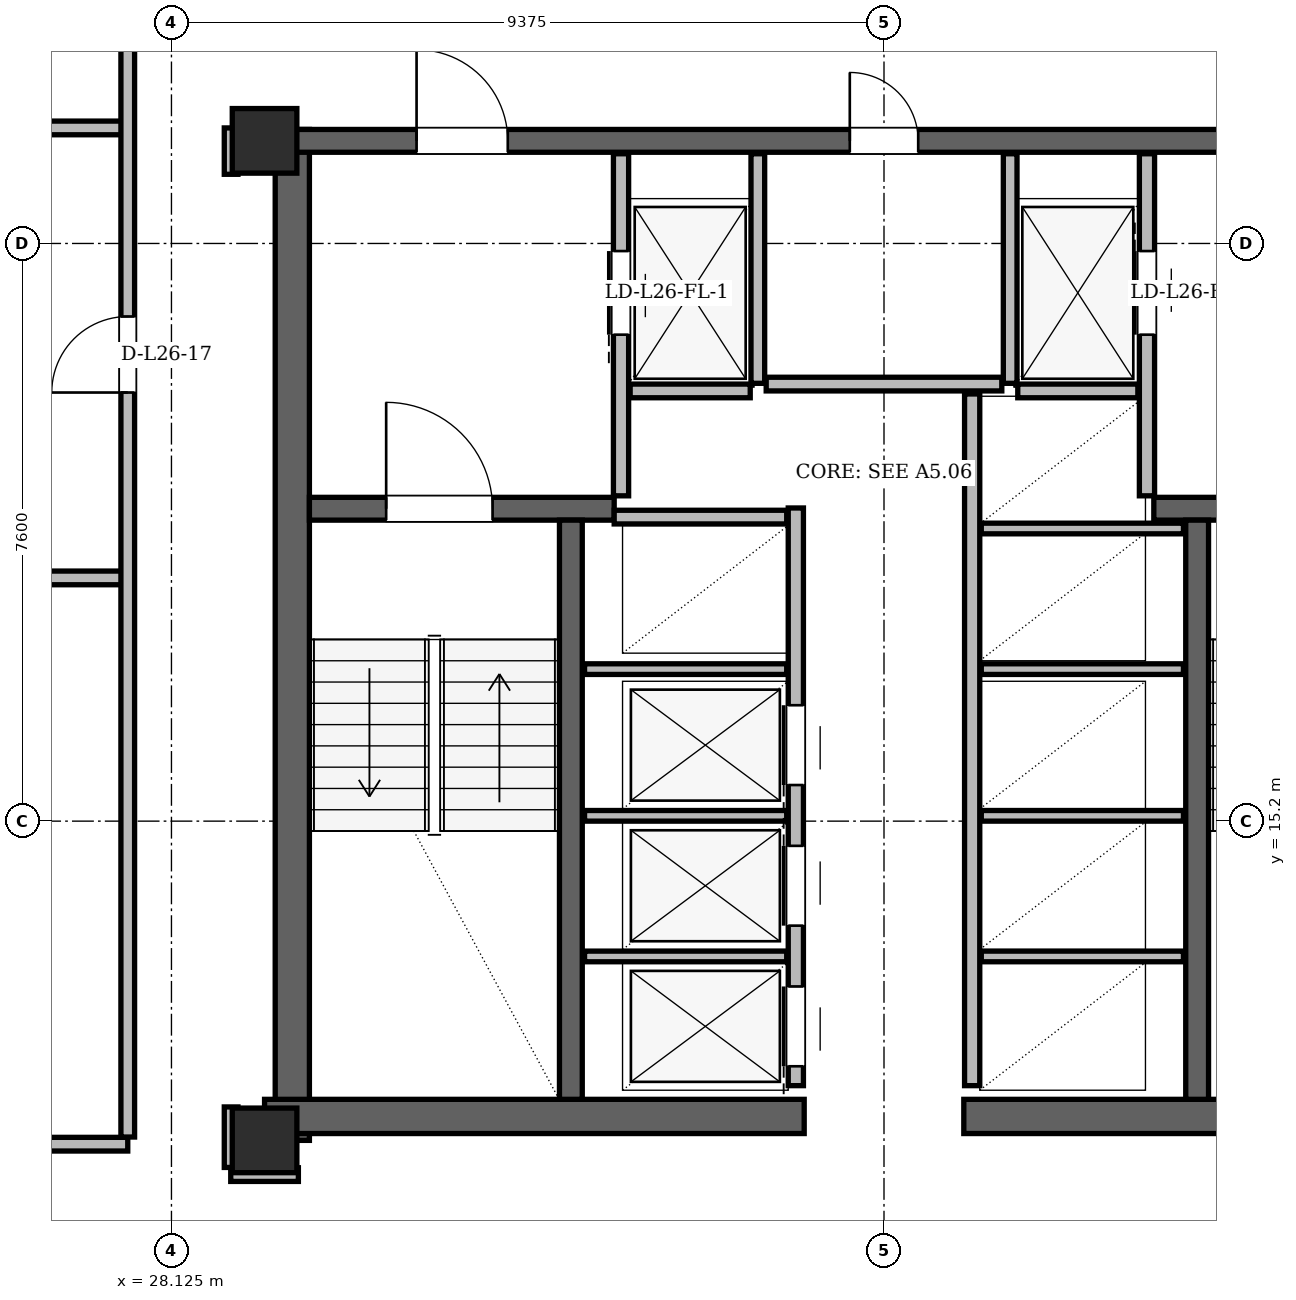
"""IFC4 building model, lengths in metres.
Left out: names, types, materials, properties, quantities, classifications, styles, units other than length and angle.
Written with IfcOpenShell. Run it as: python <this file> out.ifc"""

import sys

from ifc_helpers import new_model, si_unit, direction, frame, frame_2d, origin, origin_2d, place, context, subcontext, project, spatial, rectangle, hollow_rectangle, extrude, element, fill, save


model = new_model("IFC4")
c1 = context("Model", 3, precision=1e-05, world=origin(), true_north=direction((0.0, 1.0)))
c2 = subcontext(c1, "Body", "Model", "MODEL_VIEW")
j1 = project(units=[si_unit("LENGTHUNIT", "METRE"), si_unit("PLANEANGLEUNIT", "RADIAN")], contexts=[c1])
p1 = place(None, origin())
s1 = spatial("IfcSite", under=j1, at=p1, CompositionType="ELEMENT")
p2 = place(p1, origin())
s2 = spatial("IfcBuilding", under=s1, at=p2, CompositionType="ELEMENT")
p3 = place(p2, frame((0.0, 0.0, 100.5)))
s3 = spatial("IfcBuildingStorey", under=s2, at=p3, CompositionType="ELEMENT", Elevation=100.5)
for number, where, z_axis, x_axis in (
    (1, (29.35, 11.0, 0.0), (0.0, 0.0, 1.0), (1.0, 0.0, 0.0)),
    (2, (29.35, 24.15, 0.0), (0.0, 0.0, 1.0), (1.0, 0.0, 0.0)),
):
    element("IfcColumn", number, at=place(p3, frame(where, z_axis=z_axis, x_axis=x_axis)), inside=s3, PredefinedType="COLUMN", context=c2, shape_type="SweptSolid", body=[
        extrude(hollow_rectangle(XDim=0.85, YDim=0.85, WallThickness=0.07, at=origin_2d()), origin(), (0.0, 0.0, 1.0), 3.6),
    ])
p4 = place(p3, frame((29.715, 11.0, 0.0), z_axis=(0.0, 0.0, 1.0), x_axis=(0.0, 1.0, 0.0)))
e3 = element("IfcWall", 3, at=p4, inside=s3, PredefinedType="SHEAR", context=c2, shape_type="SweptSolid", body=[
    extrude(rectangle(XDim=13.3, YDim=0.45, at=frame_2d((6.65, 0.0))), origin(), (0.0, 0.0, 1.0), 3.36),
])
for number, where, z_axis, x_axis in (
    (4, (29.35, 11.315, 0.0), (0.0, 0.0, 1.0), (1.0, 0.0, 0.0)),
    (5, (38.55, 11.315, 0.0), (0.0, 0.0, 1.0), (1.0, 0.0, 0.0)),
):
    element("IfcWall", number, at=place(p3, frame(where, z_axis=z_axis, x_axis=x_axis)), inside=s3, PredefinedType="SHEAR", context=c2, shape_type="SweptSolid", body=[
        extrude(rectangle(XDim=7.1, YDim=0.45, at=frame_2d((3.55, 0.0))), origin(), (0.0, 0.0, 1.0), 3.36),
    ])
p5 = place(p3, frame((29.65, 24.15, 0.0), z_axis=(0.0, 0.0, 1.0), x_axis=(1.0, 0.0, 0.0)))
e6 = element("IfcWall", 6, at=p5, inside=s3, PredefinedType="SHEAR", context=c2, shape_type="SweptSolid", body=[
    extrude(rectangle(XDim=15.7, YDim=0.3, at=frame_2d((7.85, 0.0))), origin(), (0.0, 0.0, 1.0), 3.36),
])
p6 = place(p5, frame((1.7, 0.0, 0.0)))
e7 = element("IfcOpeningElement", 7, at=p6, cuts=e6, PredefinedType="OPENING", context=c2, shape_type="SweptSolid", body=[
    extrude(rectangle(XDim=1.2, YDim=2.2, at=frame_2d((0.6, 1.1))), frame((0.0, 0.15, 0.0), z_axis=(0.0, -1.0, 0.0), x_axis=(1.0, 0.0, 0.0)), (0.0, 0.0, 1.0), 0.3),
])
p7 = place(p5, frame((12.8, 0.0, 0.0)))
e8 = element("IfcOpeningElement", 8, at=p7, cuts=e6, PredefinedType="OPENING", context=c2, shape_type="SweptSolid", body=[
    extrude(rectangle(XDim=1.2, YDim=2.2, at=frame_2d((0.6, 1.1))), frame((0.0, 0.15, 0.0), z_axis=(0.0, -1.0, 0.0), x_axis=(1.0, 0.0, 0.0)), (0.0, 0.0, 1.0), 0.3),
])
p8 = place(p5, frame((7.4, 0.0, 0.0)))
e9 = element("IfcOpeningElement", 9, at=p8, cuts=e6, PredefinedType="OPENING", context=c2, shape_type="SweptSolid", body=[
    extrude(rectangle(XDim=0.9, YDim=2.05, at=frame_2d((0.45, 1.025))), frame((0.0, 0.15, 0.0), z_axis=(0.0, -1.0, 0.0), x_axis=(1.0, 0.0, 0.0)), (0.0, 0.0, 1.0), 0.3),
])
p9 = place(p3, frame((29.94, 19.31, 0.0), z_axis=(0.0, 0.0, 1.0), x_axis=(1.0, 0.0, 0.0)))
e10 = element("IfcWall", 10, at=p9, inside=s3, PredefinedType="SHEAR", context=c2, shape_type="SweptSolid", body=[
    extrude(rectangle(XDim=4.01, YDim=0.3, at=frame_2d((2.005, 0.0))), origin(), (0.0, 0.0, 1.0), 3.36),
])
p10 = place(p9, frame((1.01, 0.0, 0.0)))
e11 = element("IfcOpeningElement", 11, at=p10, cuts=e10, PredefinedType="OPENING", context=c2, shape_type="SweptSolid", body=[
    extrude(rectangle(XDim=1.4, YDim=2.2, at=frame_2d((0.7, 1.1))), frame((0.0, 0.15, 0.0), z_axis=(0.0, -1.0, 0.0), x_axis=(1.0, 0.0, 0.0)), (0.0, 0.0, 1.0), 0.3),
])
p11 = place(p3, frame((41.05, 19.31, 0.0), z_axis=(0.0, 0.0, 1.0), x_axis=(1.0, 0.0, 0.0)))
e12 = element("IfcWall", 12, at=p11, inside=s3, PredefinedType="SHEAR", context=c2, shape_type="SweptSolid", body=[
    extrude(rectangle(XDim=4.01, YDim=0.3, at=frame_2d((2.005, 0.0))), origin(), (0.0, 0.0, 1.0), 3.36),
])
p12 = place(p11, frame((1.6, 0.0, 0.0)))
e13 = element("IfcOpeningElement", 13, at=p12, cuts=e12, PredefinedType="OPENING", context=c2, shape_type="SweptSolid", body=[
    extrude(rectangle(XDim=1.4, YDim=2.2, at=frame_2d((0.7, 1.1))), frame((0.0, 0.15, 0.0), z_axis=(0.0, -1.0, 0.0), x_axis=(1.0, 0.0, 0.0)), (0.0, 0.0, 1.0), 0.3),
])
for number, where, z_axis, x_axis in (
    (14, (33.38, 11.54, 0.0), (0.0, 0.0, 1.0), (0.0, 1.0, 0.0)),
    (15, (41.62, 11.54, 0.0), (0.0, 0.0, 1.0), (0.0, 1.0, 0.0)),
):
    element("IfcWall", number, at=place(p3, frame(where, z_axis=z_axis, x_axis=x_axis)), inside=s3, PredefinedType="SHEAR", context=c2, shape_type="SweptSolid", body=[
        extrude(rectangle(XDim=7.62, YDim=0.3, at=frame_2d((3.81, 0.0))), origin(), (0.0, 0.0, 1.0), 3.36),
    ])
p13 = place(p3, frame((31.568, 43.453, 0.0), z_axis=(0.0, 0.0, 1.0), x_axis=(-0.500002056916, -0.86602421622, 0.0)))
e16 = element("IfcWall", 16, at=p13, inside=s3, PredefinedType="SOLIDWALL", context=c2, shape_type="SweptSolid", body=[
    extrude(rectangle(XDim=34.516, YDim=0.34, at=frame_2d((17.258, 0.0))), origin(), (0.0, 0.0, 1.0), 2.578),
])
p14 = place(p13, frame((8.034, 0.0, 0.0)))
e17 = element("IfcOpeningElement", 17, at=p14, cuts=e16, PredefinedType="OPENING", context=c2, shape_type="SweptSolid", body=[
    extrude(rectangle(XDim=1.5, YDim=2.2, at=frame_2d((0.75, 1.1))), frame((0.0, 0.17, 0.0), z_axis=(0.0, -1.0, 0.0), x_axis=(1.0, 0.0, 0.0)), (0.0, 0.0, 1.0), 0.34),
])
p15 = place(p13, frame((26.647, 0.0, 0.0)))
e18 = element("IfcOpeningElement", 18, at=p15, cuts=e16, PredefinedType="OPENING", context=c2, shape_type="SweptSolid", body=[
    extrude(rectangle(XDim=1.5, YDim=2.2, at=frame_2d((0.75, 1.1))), frame((0.0, 0.17, 0.0), z_axis=(0.0, -1.0, 0.0), x_axis=(1.0, 0.0, 0.0)), (0.0, 0.0, 1.0), 0.34),
])
p16 = place(p13, frame((31.672, 0.0, 0.85)))
e19 = element("IfcOpeningElement", 19, at=p16, cuts=e16, PredefinedType="OPENING", context=c2, shape_type="SweptSolid", body=[
    extrude(rectangle(XDim=1.6, YDim=1.618, at=frame_2d((0.8, 0.809))), frame((0.0, 0.17, 0.0), z_axis=(0.0, -1.0, 0.0), x_axis=(1.0, 0.0, 0.0)), (0.0, 0.0, 1.0), 0.34),
])
p17 = place(p13, frame((11.262, 0.0, 0.85)))
e20 = element("IfcOpeningElement", 20, at=p17, cuts=e16, PredefinedType="OPENING", context=c2, shape_type="SweptSolid", body=[
    extrude(rectangle(XDim=1.8, YDim=1.618, at=frame_2d((0.9, 0.809))), frame((0.0, 0.17, 0.0), z_axis=(0.0, -1.0, 0.0), x_axis=(1.0, 0.0, 0.0)), (0.0, 0.0, 1.0), 0.34),
])
p18 = place(p13, frame((18.602, 0.0, 0.85)))
e21 = element("IfcOpeningElement", 21, at=p18, cuts=e16, PredefinedType="OPENING", context=c2, shape_type="SweptSolid", body=[
    extrude(rectangle(XDim=1.2, YDim=1.48, at=frame_2d((0.6, 0.74))), frame((0.0, 0.17, 0.0), z_axis=(0.0, -1.0, 0.0), x_axis=(1.0, 0.0, 0.0)), (0.0, 0.0, 1.0), 0.34),
])
p19 = place(p13, frame((1.763, 0.0, 0.85)))
e22 = element("IfcOpeningElement", 22, at=p19, cuts=e16, PredefinedType="OPENING", context=c2, shape_type="SweptSolid", body=[
    extrude(rectangle(XDim=1.6, YDim=1.618, at=frame_2d((0.8, 0.809))), frame((0.0, 0.17, 0.0), z_axis=(0.0, -1.0, 0.0), x_axis=(1.0, 0.0, 0.0)), (0.0, 0.0, 1.0), 0.34),
])
p20 = place(p3, frame((34.04, 19.48, 0.0), z_axis=(0.0, 0.0, 1.0), x_axis=(0.0, 1.0, 0.0)))
e23 = element("IfcWall", 23, at=p20, inside=s3, PredefinedType="PARTITIONING", context=c2, shape_type="SweptSolid", body=[
    extrude(rectangle(XDim=4.5, YDim=0.2, at=frame_2d((2.25, 0.0))), origin(), (0.0, 0.0, 1.0), 2.4),
])
p21 = place(p20, frame((2.12, 0.0, 0.0)))
e24 = element("IfcOpeningElement", 24, at=p21, cuts=e23, PredefinedType="OPENING", context=c2, shape_type="SweptSolid", body=[
    extrude(rectangle(XDim=1.1, YDim=2.2, at=frame_2d((0.55, 1.1))), frame((0.0, 0.1, 0.0), z_axis=(0.0, -1.0, 0.0), x_axis=(1.0, 0.0, 0.0)), (0.0, 0.0, 1.0), 0.2),
])
p22 = place(p3, frame((35.84, 20.96, 0.0), z_axis=(0.0, 0.0, 1.0), x_axis=(0.0, 1.0, 0.0)))
e25 = element("IfcWall", 25, at=p22, inside=s3, PredefinedType="PARTITIONING", context=c2, shape_type="SweptSolid", body=[
    extrude(rectangle(XDim=3.02, YDim=0.18, at=frame_2d((1.51, 0.0))), origin(), (0.0, 0.0, 1.0), 2.4),
])
p23 = place(p3, frame((34.16, 20.86, 0.0), z_axis=(0.0, 0.0, 1.0), x_axis=(1.0, 0.0, 0.0)))
e26 = element("IfcWall", 26, at=p23, inside=s3, PredefinedType="PARTITIONING", context=c2, shape_type="SweptSolid", body=[
    extrude(rectangle(XDim=1.58, YDim=0.18, at=frame_2d((0.79, 0.0))), origin(), (0.0, 0.0, 1.0), 3.36),
])
p24 = place(p3, frame((40.96, 19.48, 0.0), z_axis=(0.0, 0.0, 1.0), x_axis=(0.0, 1.0, 0.0)))
e27 = element("IfcWall", 27, at=p24, inside=s3, PredefinedType="PARTITIONING", context=c2, shape_type="SweptSolid", body=[
    extrude(rectangle(XDim=4.5, YDim=0.2, at=frame_2d((2.25, 0.0))), origin(), (0.0, 0.0, 1.0), 2.4),
])
p25 = place(p24, frame((2.12, 0.0, 0.0)))
e28 = element("IfcOpeningElement", 28, at=p25, cuts=e27, PredefinedType="OPENING", context=c2, shape_type="SweptSolid", body=[
    extrude(rectangle(XDim=1.1, YDim=2.2, at=frame_2d((0.55, 1.1))), frame((0.0, 0.1, 0.0), z_axis=(0.0, -1.0, 0.0), x_axis=(1.0, 0.0, 0.0)), (0.0, 0.0, 1.0), 0.2),
])
p26 = place(p3, frame((39.16, 20.96, 0.0), z_axis=(0.0, 0.0, 1.0), x_axis=(0.0, 1.0, 0.0)))
e29 = element("IfcWall", 29, at=p26, inside=s3, PredefinedType="PARTITIONING", context=c2, shape_type="SweptSolid", body=[
    extrude(rectangle(XDim=3.02, YDim=0.18, at=frame_2d((1.51, 0.0))), origin(), (0.0, 0.0, 1.0), 2.4),
])
p27 = place(p3, frame((39.26, 20.86, 0.0), z_axis=(0.0, 0.0, 1.0), x_axis=(1.0, 0.0, 0.0)))
e30 = element("IfcWall", 30, at=p27, inside=s3, PredefinedType="PARTITIONING", context=c2, shape_type="SweptSolid", body=[
    extrude(rectangle(XDim=1.58, YDim=0.18, at=frame_2d((0.79, 0.0))), origin(), (0.0, 0.0, 1.0), 3.36),
])
p28 = place(p3, frame((36.34, 11.72, 0.0), z_axis=(0.0, 0.0, 1.0), x_axis=(0.0, 1.0, 0.0)))
e31 = element("IfcWall", 31, at=p28, inside=s3, PredefinedType="PARTITIONING", context=c2, shape_type="SweptSolid", body=[
    extrude(rectangle(XDim=7.6, YDim=0.2, at=frame_2d((3.8, 0.0))), origin(), (0.0, 0.0, 1.0), 3.36),
])
p29 = place(p28, frame((0.255, 0.0, 0.0)))
e32 = element("IfcOpeningElement", 32, at=p29, cuts=e31, PredefinedType="OPENING", context=c2, shape_type="SweptSolid", body=[
    extrude(rectangle(XDim=1.05, YDim=2.15, at=frame_2d((0.525, 1.075))), frame((0.0, 0.1, 0.0), z_axis=(0.0, -1.0, 0.0), x_axis=(1.0, 0.0, 0.0)), (0.0, 0.0, 1.0), 0.2),
])
p30 = place(p28, frame((2.105, 0.0, 0.0)))
e33 = element("IfcOpeningElement", 33, at=p30, cuts=e31, PredefinedType="OPENING", context=c2, shape_type="SweptSolid", body=[
    extrude(rectangle(XDim=1.05, YDim=2.15, at=frame_2d((0.525, 1.075))), frame((0.0, 0.1, 0.0), z_axis=(0.0, -1.0, 0.0), x_axis=(1.0, 0.0, 0.0)), (0.0, 0.0, 1.0), 0.2),
])
p31 = place(p28, frame((3.955, 0.0, 0.0)))
e34 = element("IfcOpeningElement", 34, at=p31, cuts=e31, PredefinedType="OPENING", context=c2, shape_type="SweptSolid", body=[
    extrude(rectangle(XDim=1.05, YDim=2.15, at=frame_2d((0.525, 1.075))), frame((0.0, 0.1, 0.0), z_axis=(0.0, -1.0, 0.0), x_axis=(1.0, 0.0, 0.0)), (0.0, 0.0, 1.0), 0.2),
])
p32 = place(p3, frame((33.95, 19.2, 0.0), z_axis=(0.0, 0.0, 1.0), x_axis=(1.0, 0.0, 0.0)))
e35 = element("IfcWall", 35, at=p32, inside=s3, PredefinedType="PARTITIONING", context=c2, shape_type="SweptSolid", body=[
    extrude(rectangle(XDim=2.27, YDim=0.18, at=frame_2d((1.135, 0.0))), origin(), (0.0, 0.0, 1.0), 3.36),
])
for number, where, z_axis, x_axis in (
    (36, (33.56, 13.42, 0.0), (0.0, 0.0, 1.0), (1.0, 0.0, 0.0)),
    (37, (33.56, 15.27, 0.0), (0.0, 0.0, 1.0), (1.0, 0.0, 0.0)),
    (38, (33.56, 17.2, 0.0), (0.0, 0.0, 1.0), (1.0, 0.0, 0.0)),
):
    element("IfcWall", number, at=place(p3, frame(where, z_axis=z_axis, x_axis=x_axis)), inside=s3, PredefinedType="PARTITIONING", context=c2, shape_type="SweptSolid", body=[
        extrude(rectangle(XDim=2.66, YDim=0.14, at=frame_2d((1.33, 0.0))), origin(), (0.0, 0.0, 1.0), 3.36),
    ])
p33 = place(p3, frame((38.66, 11.72, 0.0), z_axis=(0.0, 0.0, 1.0), x_axis=(0.0, 1.0, 0.0)))
e39 = element("IfcWall", 39, at=p33, inside=s3, PredefinedType="PARTITIONING", context=c2, shape_type="SweptSolid", body=[
    extrude(rectangle(XDim=9.1, YDim=0.2, at=frame_2d((4.55, 0.0))), origin(), (0.0, 0.0, 1.0), 3.36),
])
for number, where, z_axis, x_axis in (
    (40, (38.78, 13.42, 0.0), (0.0, 0.0, 1.0), (1.0, 0.0, 0.0)),
    (41, (38.78, 15.27, 0.0), (0.0, 0.0, 1.0), (1.0, 0.0, 0.0)),
    (42, (38.78, 17.2, 0.0), (0.0, 0.0, 1.0), (1.0, 0.0, 0.0)),
    (43, (38.78, 19.05, 0.0), (0.0, 0.0, 1.0), (1.0, 0.0, 0.0)),
):
    element("IfcWall", number, at=place(p3, frame(where, z_axis=z_axis, x_axis=x_axis)), inside=s3, PredefinedType="PARTITIONING", context=c2, shape_type="SweptSolid", body=[
        extrude(rectangle(XDim=2.66, YDim=0.14, at=frame_2d((1.33, 0.0))), origin(), (0.0, 0.0, 1.0), 3.36),
    ])
p34 = place(p3, frame((35.95, 20.95, 0.0), z_axis=(0.0, 0.0, 1.0), x_axis=(1.0, 0.0, 0.0)))
e44 = element("IfcWall", 44, at=p34, inside=s3, PredefinedType="PARTITIONING", context=c2, shape_type="SweptSolid", body=[
    extrude(rectangle(XDim=3.1, YDim=0.18, at=frame_2d((1.55, 0.0))), origin(), (0.0, 0.0, 1.0), 3.36),
])
p35 = place(p3, frame((28.905, 10.55, 0.0), z_axis=(0.0, 0.0, 1.0), x_axis=(1.0, 0.0, 0.0)))
e45 = element("IfcWall", 45, at=p35, inside=s3, PredefinedType="PARTITIONING", context=c2, shape_type="SweptSolid", body=[
    extrude(rectangle(XDim=0.89, YDim=0.18, at=frame_2d((0.445, 0.0))), origin(), (0.0, 0.0, 1.0), 3.36),
])
p36 = place(p3, frame((19.2, 10.95, 0.0), z_axis=(0.0, 0.0, 1.0), x_axis=(1.0, 0.0, 0.0)))
e46 = element("IfcWall", 46, at=p36, inside=s3, PredefinedType="PARTITIONING", context=c2, shape_type="SweptSolid", body=[
    extrude(rectangle(XDim=8.35, YDim=0.18, at=frame_2d((4.175, 0.0))), origin(), (0.0, 0.0, 1.0), 3.36),
])
p37 = place(p3, frame((17.32, 18.4, 0.0), z_axis=(0.0, 0.0, 1.0), x_axis=(1.0, 0.0, 0.0)))
e47 = element("IfcWall", 47, at=p37, inside=s3, PredefinedType="PARTITIONING", context=c2, shape_type="SweptSolid", body=[
    extrude(rectangle(XDim=10.29, YDim=0.18, at=frame_2d((5.145, 0.0))), origin(), (0.0, 0.0, 1.0), 3.36),
])
p38 = place(p3, frame((20.723, 24.32, 0.0), z_axis=(0.0, 0.0, 1.0), x_axis=(1.0, 0.0, 0.0)))
e48 = element("IfcWall", 48, at=p38, inside=s3, PredefinedType="PARTITIONING", context=c2, shape_type="SweptSolid", body=[
    extrude(rectangle(XDim=6.887, YDim=0.18, at=frame_2d((3.444, 0.0))), origin(), (0.0, 0.0, 1.0), 3.36),
])
p39 = place(p3, frame((27.55, 11.044, 0.0), z_axis=(0.0, 0.0, 1.0), x_axis=(0.0, 1.0, 0.0)))
e49 = element("IfcWall", 49, at=p39, inside=s3, PredefinedType="PARTITIONING", context=c2, shape_type="SweptSolid", body=[
    extrude(rectangle(XDim=14.832, YDim=0.18, at=frame_2d((7.416, 0.0))), origin(), (0.0, 0.0, 1.0), 2.814),
])
p40 = place(p39, frame((9.795, 0.0, 0.0)))
e50 = element("IfcOpeningElement", 50, at=p40, cuts=e49, PredefinedType="OPENING", context=c2, shape_type="SweptSolid", body=[
    extrude(rectangle(XDim=1.0, YDim=2.18, at=frame_2d((0.5, 1.09))), frame((0.0, 0.09, 0.0), z_axis=(0.0, -1.0, 0.0), x_axis=(1.0, 0.0, 0.0)), (0.0, 0.0, 1.0), 0.18),
])
p41 = place(p3, frame((28.91, 10.644, 0.0), z_axis=(0.0, 0.0, 1.0), x_axis=(0.0, 1.0, 0.0)))
e51 = element("IfcWall", 51, at=p41, inside=s3, PredefinedType="PARTITIONING", context=c2, shape_type="SweptSolid", body=[
    extrude(rectangle(XDim=0.796, YDim=0.18, at=frame_2d((0.398, 0.0))), origin(), (0.0, 0.0, 1.0), 2.814),
])
p42 = place(p3, frame((28.91, 23.71, 0.0), z_axis=(0.0, 0.0, 1.0), x_axis=(0.0, 1.0, 0.0)))
e52 = element("IfcWall", 52, at=p42, inside=s3, PredefinedType="PARTITIONING", context=c2, shape_type="SweptSolid", body=[
    extrude(rectangle(XDim=0.61, YDim=0.18, at=frame_2d((0.305, 0.0))), origin(), (0.0, 0.0, 1.0), 3.36),
])
p43 = place(p21, origin())
e53 = element("IfcDoor", 53, at=p43, inside=s3, OperationType="SLIDING_TO_LEFT", PredefinedType="DOOR", context=c2, shape_type="SweptSolid", body=[
    extrude(rectangle(XDim=1.1, YDim=2.2, at=frame_2d((0.55, 1.1))), frame((0.0, 0.025, 0.0), z_axis=(0.0, -1.0, 0.0), x_axis=(1.0, 0.0, 0.0)), (0.0, 0.0, 1.0), 0.05),
])
fill(e24, e53)
p44 = place(p25, origin())
e54 = element("IfcDoor", 54, at=p44, inside=s3, OperationType="SLIDING_TO_RIGHT", PredefinedType="DOOR", context=c2, shape_type="SweptSolid", body=[
    extrude(rectangle(XDim=1.1, YDim=2.2, at=frame_2d((0.55, 1.1))), frame((0.0, 0.025, 0.0), z_axis=(0.0, -1.0, 0.0), x_axis=(1.0, 0.0, 0.0)), (0.0, 0.0, 1.0), 0.05),
])
fill(e28, e54)
p45 = place(p29, origin())
e55 = element("IfcDoor", 55, at=p45, inside=s3, OperationType="SLIDING_TO_LEFT", PredefinedType="DOOR", context=c2, shape_type="SweptSolid", body=[
    extrude(rectangle(XDim=1.05, YDim=2.15, at=frame_2d((0.525, 1.075))), frame((0.0, 0.025, 0.0), z_axis=(0.0, -1.0, 0.0), x_axis=(1.0, 0.0, 0.0)), (0.0, 0.0, 1.0), 0.05),
])
fill(e32, e55)
p46 = place(p30, origin())
e56 = element("IfcDoor", 56, at=p46, inside=s3, OperationType="SLIDING_TO_RIGHT", PredefinedType="DOOR", context=c2, shape_type="SweptSolid", body=[
    extrude(rectangle(XDim=1.05, YDim=2.15, at=frame_2d((0.525, 1.075))), frame((0.0, 0.025, 0.0), z_axis=(0.0, -1.0, 0.0), x_axis=(1.0, 0.0, 0.0)), (0.0, 0.0, 1.0), 0.05),
])
fill(e33, e56)
p47 = place(p31, origin())
e57 = element("IfcDoor", 57, at=p47, inside=s3, OperationType="SLIDING_TO_LEFT", PredefinedType="DOOR", context=c2, shape_type="SweptSolid", body=[
    extrude(rectangle(XDim=1.05, YDim=2.15, at=frame_2d((0.525, 1.075))), frame((0.0, 0.025, 0.0), z_axis=(0.0, -1.0, 0.0), x_axis=(1.0, 0.0, 0.0)), (0.0, 0.0, 1.0), 0.05),
])
fill(e34, e57)
p48 = place(p10, origin())
e58 = element("IfcDoor", 58, at=p48, inside=s3, OperationType="SINGLE_SWING_LEFT", PredefinedType="DOOR", context=c2, shape_type="SweptSolid", body=[
    extrude(rectangle(XDim=1.4, YDim=2.2, at=frame_2d((0.7, 1.1))), frame((0.0, 0.025, 0.0), z_axis=(0.0, -1.0, 0.0), x_axis=(1.0, 0.0, 0.0)), (0.0, 0.0, 1.0), 0.05),
])
fill(e11, e58)
p49 = place(p6, origin())
e59 = element("IfcDoor", 59, at=p49, inside=s3, OperationType="SINGLE_SWING_LEFT", PredefinedType="DOOR", context=c2, shape_type="SweptSolid", body=[
    extrude(rectangle(XDim=1.2, YDim=2.2, at=frame_2d((0.6, 1.1))), frame((0.0, 0.025, 0.0), z_axis=(0.0, -1.0, 0.0), x_axis=(1.0, 0.0, 0.0)), (0.0, 0.0, 1.0), 0.05),
])
fill(e7, e59)
p50 = place(p8, origin())
e60 = element("IfcDoor", 60, at=p50, inside=s3, OperationType="SINGLE_SWING_LEFT", PredefinedType="DOOR", context=c2, shape_type="SweptSolid", body=[
    extrude(rectangle(XDim=0.9, YDim=2.05, at=frame_2d((0.45, 1.025))), frame((0.0, 0.025, 0.0), z_axis=(0.0, -1.0, 0.0), x_axis=(1.0, 0.0, 0.0)), (0.0, 0.0, 1.0), 0.05),
])
fill(e9, e60)
p51 = place(p40, origin())
e61 = element("IfcDoor", 61, at=p51, inside=s3, OperationType="SINGLE_SWING_LEFT", PredefinedType="DOOR", context=c2, shape_type="SweptSolid", body=[
    extrude(rectangle(XDim=1.0, YDim=2.18, at=frame_2d((0.5, 1.09))), frame((0.0, 0.025, 0.0), z_axis=(0.0, -1.0, 0.0), x_axis=(1.0, 0.0, 0.0)), (0.0, 0.0, 1.0), 0.05),
])
fill(e50, e61)
save(model, sys.argv[1])
